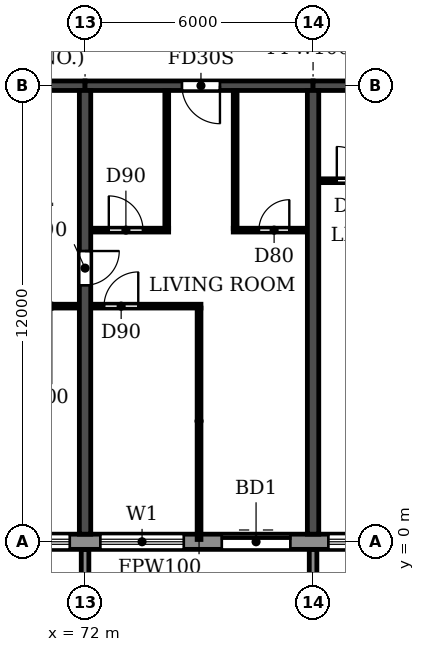
"""IFC4 building model, lengths in metres.
Left out: names, types, materials, properties, quantities, classifications, styles, units other than length and angle.
Written with IfcOpenShell. Run it as: python <this file> out.ifc"""

import sys

from ifc_helpers import new_model, si_unit, direction, frame, frame_2d, origin, place, context, subcontext, project, spatial, polyline, rectangle, outline, extrude, source, transform, mapped, element, fill, save


model = new_model("IFC4")
c1 = context("Model", 3, precision=1e-05, world=origin(), true_north=direction((0.0, 1.0)))
c2 = subcontext(c1, "Body", "Model", "MODEL_VIEW")
j1 = project(units=[si_unit("LENGTHUNIT", "METRE"), si_unit("PLANEANGLEUNIT", "RADIAN")], contexts=[c1])
p1 = place(None, origin())
s1 = spatial("IfcSite", under=j1, at=p1, CompositionType="ELEMENT")
p2 = place(p1, origin())
s2 = spatial("IfcBuilding", under=s1, at=p2, CompositionType="ELEMENT")
p3 = place(p2, frame((0.0, 0.0, 122.4)))
s3 = spatial("IfcBuildingStorey", under=s2, at=p3, CompositionType="ELEMENT", Elevation=122.4)
p4 = place(p3, frame((72.0, 0.2, 0.0), z_axis=(0.0, 0.0, 1.0), x_axis=(0.0, 1.0, 0.0)))
e1 = element("IfcWall", 1, at=p4, inside=s3, PredefinedType="SHEAR", context=c2, shape_type="SweptSolid", body=[
    extrude(rectangle(XDim=11.675, YDim=0.3, at=frame_2d((5.837, 0.0))), origin(), (0.0, 0.0, 1.0), 3.07),
])
p5 = place(p4, frame((6.55, 0.0, 0.0)))
e2 = element("IfcOpeningElement", 2, at=p5, cuts=e1, PredefinedType="OPENING", context=c2, shape_type="SweptSolid", body=[
    extrude(rectangle(XDim=0.9, YDim=2.1, at=frame_2d((0.45, 1.05))), frame((0.0, 0.16, 0.0), z_axis=(0.0, -1.0, 0.0), x_axis=(1.0, 0.0, 0.0)), (0.0, 0.0, 1.0), 0.32),
])
p6 = place(p3, frame((78.0, 0.2, 0.0), z_axis=(0.0, 0.0, 1.0), x_axis=(0.0, 1.0, 0.0)))
e3 = element("IfcWall", 3, at=p6, inside=s3, PredefinedType="SHEAR", context=c2, shape_type="SweptSolid", body=[
    extrude(rectangle(XDim=11.675, YDim=0.3, at=frame_2d((5.837, 0.0))), origin(), (0.0, 0.0, 1.0), 3.07),
])
p7 = place(p3, frame((66.0, 12.0, 0.0), z_axis=(0.0, 0.0, 1.0), x_axis=(1.0, 0.0, 0.0)))
e4 = element("IfcWall", 4, at=p7, inside=s3, PredefinedType="SHEAR", context=c2, shape_type="SweptSolid", body=[
    extrude(rectangle(XDim=6.0, YDim=0.25, at=frame_2d((3.0, 0.0))), origin(), (0.0, 0.0, 1.0), 2.47),
])
p8 = place(p3, frame((72.0, 12.0, 0.0), z_axis=(0.0, 0.0, 1.0), x_axis=(1.0, 0.0, 0.0)))
e5 = element("IfcWall", 5, at=p8, inside=s3, PredefinedType="SHEAR", context=c2, shape_type="SweptSolid", body=[
    extrude(rectangle(XDim=6.0, YDim=0.25, at=frame_2d((3.0, 0.0))), origin(), (0.0, 0.0, 1.0), 2.47),
])
p9 = place(p8, frame((2.55, 0.0, 0.0)))
e6 = element("IfcOpeningElement", 6, at=p9, cuts=e5, PredefinedType="OPENING", context=c2, shape_type="SweptSolid", body=[
    extrude(rectangle(XDim=1.0, YDim=2.1, at=frame_2d((0.5, 1.05))), frame((0.0, 0.135, 0.0), z_axis=(0.0, -1.0, 0.0), x_axis=(1.0, 0.0, 0.0)), (0.0, 0.0, 1.0), 0.27),
])
p10 = place(p3, frame((78.0, 12.0, 0.0), z_axis=(0.0, 0.0, 1.0), x_axis=(1.0, 0.0, 0.0)))
e7 = element("IfcWall", 7, at=p10, inside=s3, PredefinedType="SHEAR", context=c2, shape_type="SweptSolid", body=[
    extrude(rectangle(XDim=6.0, YDim=0.25, at=frame_2d((3.0, 0.0))), origin(), (0.0, 0.0, 1.0), 2.47),
])
p11 = place(p10, frame((2.55, 0.0, 0.0)))
e8 = element("IfcOpeningElement", 8, at=p11, cuts=e7, PredefinedType="OPENING", context=c2, shape_type="SweptSolid", body=[
    extrude(rectangle(XDim=1.0, YDim=2.1, at=frame_2d((0.5, 1.05))), frame((0.0, 0.135, 0.0), z_axis=(0.0, -1.0, 0.0), x_axis=(1.0, 0.0, 0.0)), (0.0, 0.0, 1.0), 0.27),
])
p12 = place(p3, frame((16.683, 0.0, 0.0), z_axis=(0.0, 0.0, 1.0), x_axis=(1.0, 0.0, 0.0)))
e9 = element("IfcWall", 9, at=p12, inside=s3, PredefinedType="STANDARD", context=c2, shape_type="SweptSolid", body=[
    extrude(rectangle(XDim=68.634, YDim=0.4, at=frame_2d((34.317, 0.0))), origin(), (0.0, 0.0, 1.0), 3.07),
])
p13 = place(p12, frame((1.717, 0.0, 0.9)))
e10 = element("IfcOpeningElement", 10, at=p13, cuts=e9, PredefinedType="OPENING", context=c2, shape_type="SweptSolid", body=[
    extrude(rectangle(XDim=2.2, YDim=1.5, at=frame_2d((1.1, 0.75))), frame((0.0, 0.21, 0.0), z_axis=(0.0, -1.0, 0.0), x_axis=(1.0, 0.0, 0.0)), (0.0, 0.0, 1.0), 0.42),
])
p14 = place(p12, frame((4.717, 0.0, 0.9)))
e11 = element("IfcOpeningElement", 11, at=p14, cuts=e9, PredefinedType="OPENING", context=c2, shape_type="SweptSolid", body=[
    extrude(rectangle(XDim=2.2, YDim=1.5, at=frame_2d((1.1, 0.75))), frame((0.0, 0.21, 0.0), z_axis=(0.0, -1.0, 0.0), x_axis=(1.0, 0.0, 0.0)), (0.0, 0.0, 1.0), 0.42),
])
p15 = place(p12, frame((7.717, 0.0, 0.9)))
e12 = element("IfcOpeningElement", 12, at=p15, cuts=e9, PredefinedType="OPENING", context=c2, shape_type="SweptSolid", body=[
    extrude(rectangle(XDim=2.2, YDim=1.5, at=frame_2d((1.1, 0.75))), frame((0.0, 0.21, 0.0), z_axis=(0.0, -1.0, 0.0), x_axis=(1.0, 0.0, 0.0)), (0.0, 0.0, 1.0), 0.42),
])
p16 = place(p12, frame((10.717, 0.0, 0.9)))
e13 = element("IfcOpeningElement", 13, at=p16, cuts=e9, PredefinedType="OPENING", context=c2, shape_type="SweptSolid", body=[
    extrude(rectangle(XDim=2.2, YDim=1.5, at=frame_2d((1.1, 0.75))), frame((0.0, 0.21, 0.0), z_axis=(0.0, -1.0, 0.0), x_axis=(1.0, 0.0, 0.0)), (0.0, 0.0, 1.0), 0.42),
])
p17 = place(p12, frame((13.717, 0.0, 0.9)))
e14 = element("IfcOpeningElement", 14, at=p17, cuts=e9, PredefinedType="OPENING", context=c2, shape_type="SweptSolid", body=[
    extrude(rectangle(XDim=2.2, YDim=1.5, at=frame_2d((1.1, 0.75))), frame((0.0, 0.21, 0.0), z_axis=(0.0, -1.0, 0.0), x_axis=(1.0, 0.0, 0.0)), (0.0, 0.0, 1.0), 0.42),
])
p18 = place(p12, frame((16.717, 0.0, 0.9)))
e15 = element("IfcOpeningElement", 15, at=p18, cuts=e9, PredefinedType="OPENING", context=c2, shape_type="SweptSolid", body=[
    extrude(rectangle(XDim=2.2, YDim=1.5, at=frame_2d((1.1, 0.75))), frame((0.0, 0.21, 0.0), z_axis=(0.0, -1.0, 0.0), x_axis=(1.0, 0.0, 0.0)), (0.0, 0.0, 1.0), 0.42),
])
p19 = place(p12, frame((19.717, 0.0, 0.9)))
e16 = element("IfcOpeningElement", 16, at=p19, cuts=e9, PredefinedType="OPENING", context=c2, shape_type="SweptSolid", body=[
    extrude(rectangle(XDim=2.2, YDim=1.5, at=frame_2d((1.1, 0.75))), frame((0.0, 0.21, 0.0), z_axis=(0.0, -1.0, 0.0), x_axis=(1.0, 0.0, 0.0)), (0.0, 0.0, 1.0), 0.42),
])
p20 = place(p12, frame((22.917, 0.0, 0.0)))
e17 = element("IfcOpeningElement", 17, at=p20, cuts=e9, PredefinedType="OPENING", context=c2, shape_type="SweptSolid", body=[
    extrude(rectangle(XDim=1.8, YDim=2.4, at=frame_2d((0.9, 1.2))), frame((0.0, 0.21, 0.0), z_axis=(0.0, -1.0, 0.0), x_axis=(1.0, 0.0, 0.0)), (0.0, 0.0, 1.0), 0.42),
])
p21 = place(p12, frame((25.717, 0.0, 0.9)))
e18 = element("IfcOpeningElement", 18, at=p21, cuts=e9, PredefinedType="OPENING", context=c2, shape_type="SweptSolid", body=[
    extrude(rectangle(XDim=2.2, YDim=1.5, at=frame_2d((1.1, 0.75))), frame((0.0, 0.21, 0.0), z_axis=(0.0, -1.0, 0.0), x_axis=(1.0, 0.0, 0.0)), (0.0, 0.0, 1.0), 0.42),
])
p22 = place(p12, frame((28.717, 0.0, 0.9)))
e19 = element("IfcOpeningElement", 19, at=p22, cuts=e9, PredefinedType="OPENING", context=c2, shape_type="SweptSolid", body=[
    extrude(rectangle(XDim=2.2, YDim=1.5, at=frame_2d((1.1, 0.75))), frame((0.0, 0.21, 0.0), z_axis=(0.0, -1.0, 0.0), x_axis=(1.0, 0.0, 0.0)), (0.0, 0.0, 1.0), 0.42),
])
p23 = place(p12, frame((31.717, 0.0, 0.9)))
e20 = element("IfcOpeningElement", 20, at=p23, cuts=e9, PredefinedType="OPENING", context=c2, shape_type="SweptSolid", body=[
    extrude(rectangle(XDim=2.2, YDim=1.5, at=frame_2d((1.1, 0.75))), frame((0.0, 0.21, 0.0), z_axis=(0.0, -1.0, 0.0), x_axis=(1.0, 0.0, 0.0)), (0.0, 0.0, 1.0), 0.42),
])
p24 = place(p12, frame((34.917, 0.0, 0.0)))
e21 = element("IfcOpeningElement", 21, at=p24, cuts=e9, PredefinedType="OPENING", context=c2, shape_type="SweptSolid", body=[
    extrude(rectangle(XDim=1.8, YDim=2.4, at=frame_2d((0.9, 1.2))), frame((0.0, 0.21, 0.0), z_axis=(0.0, -1.0, 0.0), x_axis=(1.0, 0.0, 0.0)), (0.0, 0.0, 1.0), 0.42),
])
p25 = place(p12, frame((37.717, 0.0, 0.9)))
e22 = element("IfcOpeningElement", 22, at=p25, cuts=e9, PredefinedType="OPENING", context=c2, shape_type="SweptSolid", body=[
    extrude(rectangle(XDim=2.2, YDim=1.5, at=frame_2d((1.1, 0.75))), frame((0.0, 0.21, 0.0), z_axis=(0.0, -1.0, 0.0), x_axis=(1.0, 0.0, 0.0)), (0.0, 0.0, 1.0), 0.42),
])
p26 = place(p12, frame((40.717, 0.0, 0.9)))
e23 = element("IfcOpeningElement", 23, at=p26, cuts=e9, PredefinedType="OPENING", context=c2, shape_type="SweptSolid", body=[
    extrude(rectangle(XDim=2.2, YDim=1.5, at=frame_2d((1.1, 0.75))), frame((0.0, 0.21, 0.0), z_axis=(0.0, -1.0, 0.0), x_axis=(1.0, 0.0, 0.0)), (0.0, 0.0, 1.0), 0.42),
])
p27 = place(p12, frame((43.717, 0.0, 0.9)))
e24 = element("IfcOpeningElement", 24, at=p27, cuts=e9, PredefinedType="OPENING", context=c2, shape_type="SweptSolid", body=[
    extrude(rectangle(XDim=2.2, YDim=1.5, at=frame_2d((1.1, 0.75))), frame((0.0, 0.21, 0.0), z_axis=(0.0, -1.0, 0.0), x_axis=(1.0, 0.0, 0.0)), (0.0, 0.0, 1.0), 0.42),
])
p28 = place(p12, frame((46.917, 0.0, 0.0)))
e25 = element("IfcOpeningElement", 25, at=p28, cuts=e9, PredefinedType="OPENING", context=c2, shape_type="SweptSolid", body=[
    extrude(rectangle(XDim=1.8, YDim=2.4, at=frame_2d((0.9, 1.2))), frame((0.0, 0.21, 0.0), z_axis=(0.0, -1.0, 0.0), x_axis=(1.0, 0.0, 0.0)), (0.0, 0.0, 1.0), 0.42),
])
p29 = place(p12, frame((49.717, 0.0, 0.9)))
e26 = element("IfcOpeningElement", 26, at=p29, cuts=e9, PredefinedType="OPENING", context=c2, shape_type="SweptSolid", body=[
    extrude(rectangle(XDim=2.2, YDim=1.5, at=frame_2d((1.1, 0.75))), frame((0.0, 0.21, 0.0), z_axis=(0.0, -1.0, 0.0), x_axis=(1.0, 0.0, 0.0)), (0.0, 0.0, 1.0), 0.42),
])
p30 = place(p12, frame((52.717, 0.0, 0.9)))
e27 = element("IfcOpeningElement", 27, at=p30, cuts=e9, PredefinedType="OPENING", context=c2, shape_type="SweptSolid", body=[
    extrude(rectangle(XDim=2.2, YDim=1.5, at=frame_2d((1.1, 0.75))), frame((0.0, 0.21, 0.0), z_axis=(0.0, -1.0, 0.0), x_axis=(1.0, 0.0, 0.0)), (0.0, 0.0, 1.0), 0.42),
])
p31 = place(p12, frame((55.717, 0.0, 0.9)))
e28 = element("IfcOpeningElement", 28, at=p31, cuts=e9, PredefinedType="OPENING", context=c2, shape_type="SweptSolid", body=[
    extrude(rectangle(XDim=2.2, YDim=1.5, at=frame_2d((1.1, 0.75))), frame((0.0, 0.21, 0.0), z_axis=(0.0, -1.0, 0.0), x_axis=(1.0, 0.0, 0.0)), (0.0, 0.0, 1.0), 0.42),
])
p32 = place(p12, frame((58.917, 0.0, 0.0)))
e29 = element("IfcOpeningElement", 29, at=p32, cuts=e9, PredefinedType="OPENING", context=c2, shape_type="SweptSolid", body=[
    extrude(rectangle(XDim=1.8, YDim=2.4, at=frame_2d((0.9, 1.2))), frame((0.0, 0.21, 0.0), z_axis=(0.0, -1.0, 0.0), x_axis=(1.0, 0.0, 0.0)), (0.0, 0.0, 1.0), 0.42),
])
p33 = place(p12, frame((61.717, 0.0, 0.9)))
e30 = element("IfcOpeningElement", 30, at=p33, cuts=e9, PredefinedType="OPENING", context=c2, shape_type="SweptSolid", body=[
    extrude(rectangle(XDim=2.2, YDim=1.5, at=frame_2d((1.1, 0.75))), frame((0.0, 0.21, 0.0), z_axis=(0.0, -1.0, 0.0), x_axis=(1.0, 0.0, 0.0)), (0.0, 0.0, 1.0), 0.42),
])
p34 = place(p12, frame((64.717, 0.0, 0.9)))
e31 = element("IfcOpeningElement", 31, at=p34, cuts=e9, PredefinedType="OPENING", context=c2, shape_type="SweptSolid", body=[
    extrude(rectangle(XDim=2.2, YDim=1.5, at=frame_2d((1.1, 0.75))), frame((0.0, 0.21, 0.0), z_axis=(0.0, -1.0, 0.0), x_axis=(1.0, 0.0, 0.0)), (0.0, 0.0, 1.0), 0.42),
])
m1 = source(origin(), c2, "Body", "SweptSolid", [
    extrude(outline(polyline([(0.0, 0.0), (0.2, 0.0), (0.2, 1.65), (0.0, 1.65), (0.0, 0.0)])), origin(), (0.0, 0.0, 1.0), 3.1),
])
for number, where in (
    (32, (71.9, -1.85, 0.0)),
    (33, (77.9, -1.85, 0.0)),
):
    element("IfcWall", number, at=place(p3, frame(where)), inside=s3, PredefinedType="STANDARD", context=c2, shape_type="MappedRepresentation", body=[
        mapped(m1, transform((0.0, 0.0, 0.0))),
    ])
p35 = place(p3, frame((66.16, 6.2, 0.0), z_axis=(0.0, 0.0, 1.0), x_axis=(1.0, 0.0, 0.0)))
e34 = element("IfcWall", 34, at=p35, inside=s3, PredefinedType="PARTITIONING", context=c2, shape_type="SweptSolid", body=[
    extrude(rectangle(XDim=5.68, YDim=0.1, at=frame_2d((2.84, 0.0))), origin(), (0.0, 0.0, 1.0), 3.07),
])
p36 = place(p35, frame((1.44, 0.0, 0.0)))
e35 = element("IfcOpeningElement", 35, at=p36, cuts=e34, PredefinedType="OPENING", context=c2, shape_type="SweptSolid", body=[
    extrude(rectangle(XDim=0.9, YDim=2.1, at=frame_2d((0.45, 1.05))), frame((0.0, 0.06, 0.0), z_axis=(0.0, -1.0, 0.0), x_axis=(1.0, 0.0, 0.0)), (0.0, 0.0, 1.0), 0.12),
])
p37 = place(p35, frame((3.34, 0.0, 0.0)))
e36 = element("IfcOpeningElement", 36, at=p37, cuts=e34, PredefinedType="OPENING", context=c2, shape_type="SweptSolid", body=[
    extrude(rectangle(XDim=0.9, YDim=2.1, at=frame_2d((0.45, 1.05))), frame((0.0, 0.06, 0.0), z_axis=(0.0, -1.0, 0.0), x_axis=(1.0, 0.0, 0.0)), (0.0, 0.0, 1.0), 0.12),
])
p38 = place(p3, frame((72.16, 6.2, 0.0), z_axis=(0.0, 0.0, 1.0), x_axis=(1.0, 0.0, 0.0)))
e37 = element("IfcWall", 37, at=p38, inside=s3, PredefinedType="PARTITIONING", context=c2, shape_type="SweptSolid", body=[
    extrude(rectangle(XDim=2.89, YDim=0.1, at=frame_2d((1.445, 0.0))), origin(), (0.0, 0.0, 1.0), 3.07),
])
p39 = place(p38, frame((0.34, 0.0, 0.0)))
e38 = element("IfcOpeningElement", 38, at=p39, cuts=e37, PredefinedType="OPENING", context=c2, shape_type="SweptSolid", body=[
    extrude(rectangle(XDim=0.9, YDim=2.1, at=frame_2d((0.45, 1.05))), frame((0.0, 0.06, 0.0), z_axis=(0.0, -1.0, 0.0), x_axis=(1.0, 0.0, 0.0)), (0.0, 0.0, 1.0), 0.12),
])
p40 = place(p3, frame((72.16, 8.2, 0.0), z_axis=(0.0, 0.0, 1.0), x_axis=(1.0, 0.0, 0.0)))
e39 = element("IfcWall", 39, at=p40, inside=s3, PredefinedType="PARTITIONING", context=c2, shape_type="SweptSolid", body=[
    extrude(rectangle(XDim=2.04, YDim=0.1, at=frame_2d((1.02, 0.0))), origin(), (0.0, 0.0, 1.0), 3.07),
])
p41 = place(p40, frame((0.465, 0.0, 0.0)))
e40 = element("IfcOpeningElement", 40, at=p41, cuts=e39, PredefinedType="OPENING", context=c2, shape_type="SweptSolid", body=[
    extrude(rectangle(XDim=0.9, YDim=2.1, at=frame_2d((0.45, 1.05))), frame((0.0, 0.06, 0.0), z_axis=(0.0, -1.0, 0.0), x_axis=(1.0, 0.0, 0.0)), (0.0, 0.0, 1.0), 0.12),
])
p42 = place(p3, frame((75.9, 8.2, 0.0), z_axis=(0.0, 0.0, 1.0), x_axis=(1.0, 0.0, 0.0)))
e41 = element("IfcWall", 41, at=p42, inside=s3, PredefinedType="PARTITIONING", context=c2, shape_type="SweptSolid", body=[
    extrude(rectangle(XDim=1.94, YDim=0.1, at=frame_2d((0.97, 0.0))), origin(), (0.0, 0.0, 1.0), 3.07),
])
p43 = place(p42, frame((0.675, 0.0, 0.0)))
e42 = element("IfcOpeningElement", 42, at=p43, cuts=e41, PredefinedType="OPENING", context=c2, shape_type="SweptSolid", body=[
    extrude(rectangle(XDim=0.8, YDim=2.1, at=frame_2d((0.4, 1.05))), frame((0.0, 0.06, 0.0), z_axis=(0.0, -1.0, 0.0), x_axis=(1.0, 0.0, 0.0)), (0.0, 0.0, 1.0), 0.12),
])
p44 = place(p3, frame((78.16, 9.5, 0.0), z_axis=(0.0, 0.0, 1.0), x_axis=(1.0, 0.0, 0.0)))
e43 = element("IfcWall", 43, at=p44, inside=s3, PredefinedType="PARTITIONING", context=c2, shape_type="SweptSolid", body=[
    extrude(rectangle(XDim=2.04, YDim=0.1, at=frame_2d((1.02, 0.0))), origin(), (0.0, 0.0, 1.0), 3.07),
])
p45 = place(p44, frame((0.465, 0.0, 0.0)))
e44 = element("IfcOpeningElement", 44, at=p45, cuts=e43, PredefinedType="OPENING", context=c2, shape_type="SweptSolid", body=[
    extrude(rectangle(XDim=0.9, YDim=2.1, at=frame_2d((0.45, 1.05))), frame((0.0, 0.06, 0.0), z_axis=(0.0, -1.0, 0.0), x_axis=(1.0, 0.0, 0.0)), (0.0, 0.0, 1.0), 0.12),
])
p46 = place(p3, frame((74.15, 8.25, 0.0), z_axis=(0.0, 0.0, 1.0), x_axis=(0.0, 1.0, 0.0)))
e45 = element("IfcWall", 45, at=p46, inside=s3, PredefinedType="PARTITIONING", context=c2, shape_type="SweptSolid", body=[
    extrude(rectangle(XDim=3.615, YDim=0.1, at=frame_2d((1.808, 0.0))), origin(), (0.0, 0.0, 1.0), 3.07),
])
p47 = place(p3, frame((75.0, 0.06, 0.0), z_axis=(0.0, 0.0, 1.0), x_axis=(0.0, 1.0, 0.0)))
e46 = element("IfcWall", 46, at=p47, inside=s3, PredefinedType="PARTITIONING", context=c2, shape_type="SweptSolid", body=[
    extrude(rectangle(XDim=6.09, YDim=0.1, at=frame_2d((3.045, 0.0))), origin(), (0.0, 0.0, 1.0), 3.07),
])
p48 = place(p3, frame((75.95, 8.25, 0.0), z_axis=(0.0, 0.0, 1.0), x_axis=(0.0, 1.0, 0.0)))
e47 = element("IfcWall", 47, at=p48, inside=s3, PredefinedType="PARTITIONING", context=c2, shape_type="SweptSolid", body=[
    extrude(rectangle(XDim=3.615, YDim=0.1, at=frame_2d((1.808, 0.0))), origin(), (0.0, 0.0, 1.0), 3.07),
])
p49 = place(p30, origin())
e48 = element("IfcWindow", 48, at=p49, inside=s3, PartitioningType="DOUBLE_PANEL_HORIZONTAL", PredefinedType="WINDOW", context=c2, shape_type="SweptSolid", body=[
    extrude(rectangle(XDim=2.2, YDim=1.5, at=frame_2d((1.1, 0.75))), frame((0.0, 0.03, 0.0), z_axis=(0.0, -1.0, 0.0), x_axis=(1.0, 0.0, 0.0)), (0.0, 0.0, 1.0), 0.06),
])
fill(e27, e48)
p50 = place(p31, origin())
e49 = element("IfcWindow", 49, at=p50, inside=s3, PartitioningType="DOUBLE_PANEL_HORIZONTAL", PredefinedType="WINDOW", context=c2, shape_type="SweptSolid", body=[
    extrude(rectangle(XDim=2.2, YDim=1.5, at=frame_2d((1.1, 0.75))), frame((0.0, 0.03, 0.0), z_axis=(0.0, -1.0, 0.0), x_axis=(1.0, 0.0, 0.0)), (0.0, 0.0, 1.0), 0.06),
])
fill(e28, e49)
p51 = place(p32, origin())
e50 = element("IfcDoor", 50, at=p51, inside=s3, OperationType="DOUBLE_DOOR_SLIDING", PredefinedType="DOOR", context=c2, shape_type="SweptSolid", body=[
    extrude(rectangle(XDim=1.8, YDim=2.4, at=frame_2d((0.9, 1.2))), frame((0.0, 0.025, 0.0), z_axis=(0.0, -1.0, 0.0), x_axis=(1.0, 0.0, 0.0)), (0.0, 0.0, 1.0), 0.05),
])
fill(e29, e50)
p52 = place(p33, origin())
e51 = element("IfcWindow", 51, at=p52, inside=s3, PartitioningType="DOUBLE_PANEL_HORIZONTAL", PredefinedType="WINDOW", context=c2, shape_type="SweptSolid", body=[
    extrude(rectangle(XDim=2.2, YDim=1.5, at=frame_2d((1.1, 0.75))), frame((0.0, 0.03, 0.0), z_axis=(0.0, -1.0, 0.0), x_axis=(1.0, 0.0, 0.0)), (0.0, 0.0, 1.0), 0.06),
])
fill(e30, e51)
p53 = place(p5, frame((0.9, 0.0, 0.0), z_axis=(0.0, 0.0, 1.0), x_axis=(-1.0, 0.0, 0.0)))
e52 = element("IfcDoor", 52, at=p53, inside=s3, OperationType="SINGLE_SWING_LEFT", PredefinedType="DOOR", context=c2, shape_type="SweptSolid", body=[
    extrude(rectangle(XDim=0.9, YDim=2.1, at=frame_2d((0.45, 1.05))), frame((0.0, 0.025, 0.0), z_axis=(0.0, -1.0, 0.0), x_axis=(1.0, 0.0, 0.0)), (0.0, 0.0, 1.0), 0.05),
])
fill(e2, e52)
p54 = place(p39, origin())
e53 = element("IfcDoor", 53, at=p54, inside=s3, OperationType="SINGLE_SWING_RIGHT", PredefinedType="DOOR", context=c2, shape_type="SweptSolid", body=[
    extrude(rectangle(XDim=0.9, YDim=2.1, at=frame_2d((0.45, 1.05))), frame((0.0, 0.025, 0.0), z_axis=(0.0, -1.0, 0.0), x_axis=(1.0, 0.0, 0.0)), (0.0, 0.0, 1.0), 0.05),
])
fill(e38, e53)
p55 = place(p41, origin())
e54 = element("IfcDoor", 54, at=p55, inside=s3, OperationType="SINGLE_SWING_LEFT", PredefinedType="DOOR", context=c2, shape_type="SweptSolid", body=[
    extrude(rectangle(XDim=0.9, YDim=2.1, at=frame_2d((0.45, 1.05))), frame((0.0, 0.025, 0.0), z_axis=(0.0, -1.0, 0.0), x_axis=(1.0, 0.0, 0.0)), (0.0, 0.0, 1.0), 0.05),
])
fill(e40, e54)
p56 = place(p9, frame((1.0, 0.0, 0.0), z_axis=(0.0, 0.0, 1.0), x_axis=(-1.0, 0.0, 0.0)))
e55 = element("IfcDoor", 55, at=p56, inside=s3, OperationType="SINGLE_SWING_LEFT", PredefinedType="DOOR", context=c2, shape_type="SweptSolid", body=[
    extrude(rectangle(XDim=1.0, YDim=2.1, at=frame_2d((0.5, 1.05))), frame((0.0, 0.025, 0.0), z_axis=(0.0, -1.0, 0.0), x_axis=(1.0, 0.0, 0.0)), (0.0, 0.0, 1.0), 0.05),
])
fill(e6, e55)
p57 = place(p43, origin())
e56 = element("IfcDoor", 56, at=p57, inside=s3, OperationType="SINGLE_SWING_RIGHT", PredefinedType="DOOR", context=c2, shape_type="SweptSolid", body=[
    extrude(rectangle(XDim=0.8, YDim=2.1, at=frame_2d((0.4, 1.05))), frame((0.0, 0.025, 0.0), z_axis=(0.0, -1.0, 0.0), x_axis=(1.0, 0.0, 0.0)), (0.0, 0.0, 1.0), 0.05),
])
fill(e42, e56)
p58 = place(p45, origin())
e57 = element("IfcDoor", 57, at=p58, inside=s3, OperationType="SINGLE_SWING_LEFT", PredefinedType="DOOR", context=c2, shape_type="SweptSolid", body=[
    extrude(rectangle(XDim=0.9, YDim=2.1, at=frame_2d((0.45, 1.05))), frame((0.0, 0.025, 0.0), z_axis=(0.0, -1.0, 0.0), x_axis=(1.0, 0.0, 0.0)), (0.0, 0.0, 1.0), 0.05),
])
fill(e44, e57)
save(model, sys.argv[1])
